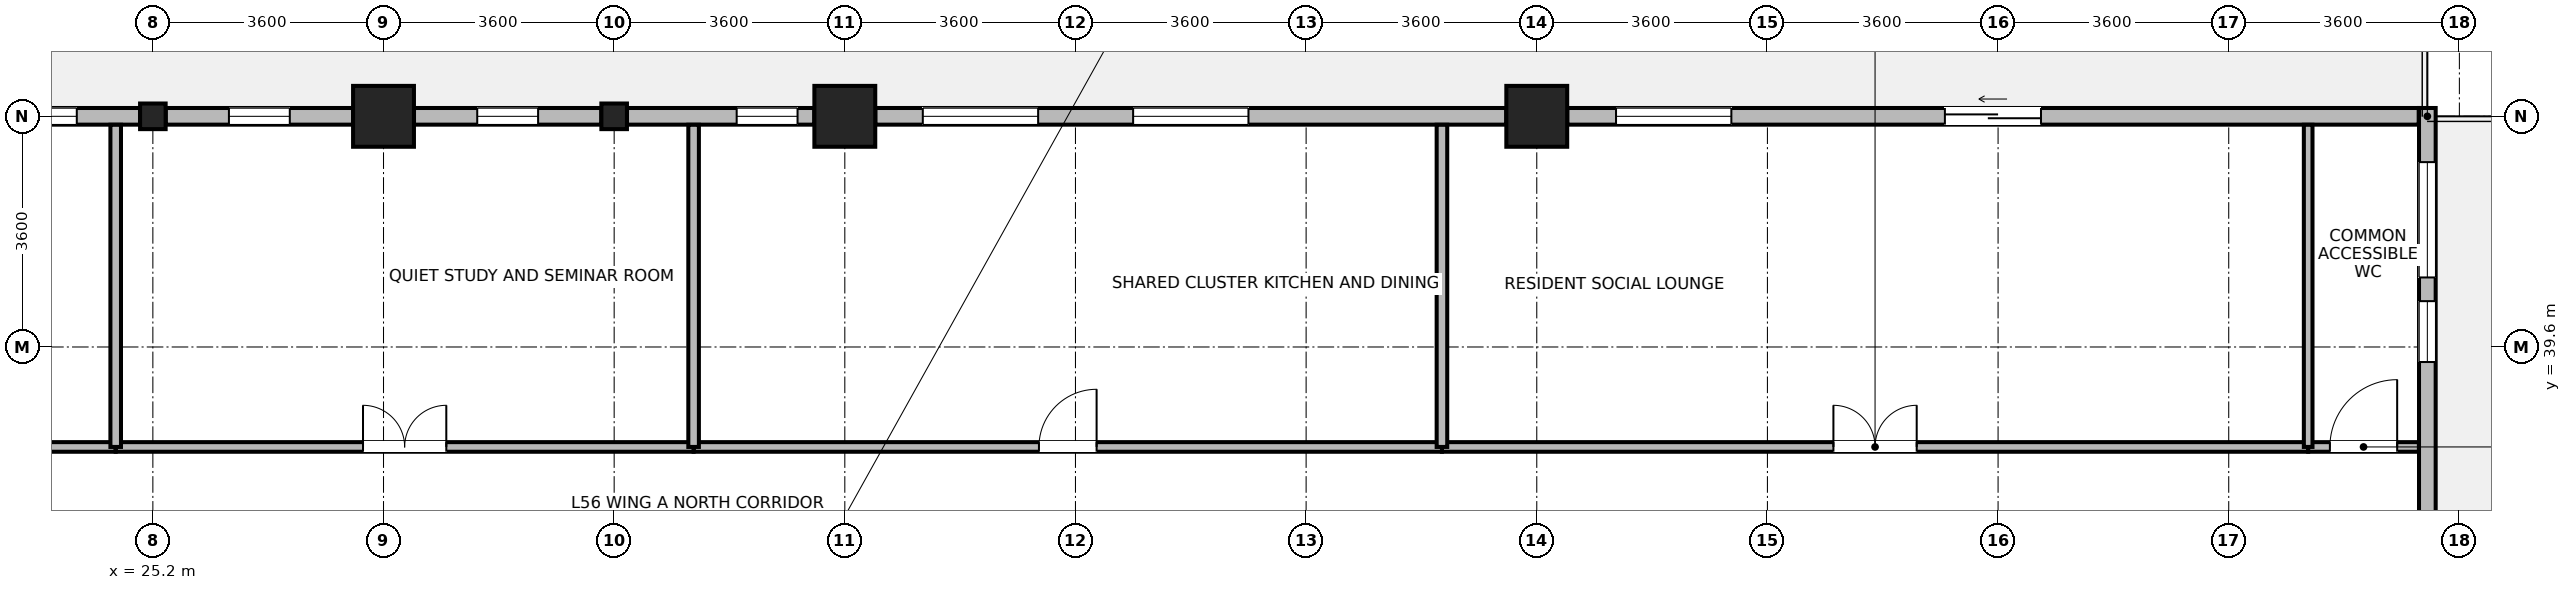
"""IFC4 building model, lengths in metres.
Left out: names, types, materials, properties, quantities, classifications, styles, units other than length and angle.
Written with IfcOpenShell. Run it as: python <this file> out.ifc"""

import sys

from ifc_helpers import new_model, si_unit, direction, frame, frame_2d, origin, origin_2d, place, context, subcontext, project, spatial, rectangle, i_section, extrude, source, transform, mapped, element, fill, save


model = new_model("IFC4")
c1 = context("Model", 3, precision=1e-05, world=origin(), true_north=direction((0.0, 1.0)))
c2 = subcontext(c1, "Body", "Model", "MODEL_VIEW")
j1 = project(units=[si_unit("LENGTHUNIT", "METRE"), si_unit("PLANEANGLEUNIT", "RADIAN")], contexts=[c1])
p1 = place(None, origin())
s1 = spatial("IfcSite", under=j1, at=p1, CompositionType="ELEMENT")
p2 = place(p1, origin())
s2 = spatial("IfcBuilding", under=s1, at=p2, CompositionType="ELEMENT")
p3 = place(p2, frame((0.0, 0.0, 220.3)))
s3 = spatial("IfcBuildingStorey", under=s2, at=p3, CompositionType="ELEMENT", Elevation=220.3)
m1 = source(origin(), c2, "Body", "SweptSolid", [
    extrude(rectangle(XDim=0.95, YDim=0.95, at=origin_2d()), origin(), (0.0, 0.0, 1.0), 3.7),
])
for number, where, z_axis, x_axis in (
    (1, (28.8, 43.2, 0.0), (0.0, 0.0, 1.0), (1.0, 0.0, 0.0)),
    (2, (36.0, 43.2, 0.0), (0.0, 0.0, 1.0), (1.0, 0.0, 0.0)),
    (3, (46.8, 43.2, 0.0), (0.0, 0.0, 1.0), (1.0, 0.0, 0.0)),
):
    element("IfcColumn", number, at=place(p3, frame(where, z_axis=z_axis, x_axis=x_axis)), inside=s3, PredefinedType="COLUMN", context=c2, shape_type="MappedRepresentation", body=[
        mapped(m1, transform((0.0, 0.0, 0.0), x_axis=(1.0, 0.0, 0.0), y_axis=(0.0, 1.0, 0.0), z_axis=(0.0, 0.0, 1.0), scale=1.0)),
    ])
m2 = source(origin(), c2, "Body", "SweptSolid", [
    extrude(i_section(OverallWidth=0.399, OverallDepth=0.4, WebThickness=0.017, FlangeThickness=0.023, FilletRadius=0.015, at=origin_2d()), origin(), (0.0, 0.0, 1.0), 3.7),
])
for number, where, z_axis, x_axis in (
    (4, (25.2, 43.2, 0.0), (0.0, 0.0, 1.0), (1.0, 0.0, 0.0)),
    (5, (32.4, 43.2, 0.0), (0.0, 0.0, 1.0), (1.0, 0.0, 0.0)),
):
    element("IfcColumn", number, at=place(p3, frame(where, z_axis=z_axis, x_axis=x_axis)), inside=s3, PredefinedType="COLUMN", context=c2, shape_type="MappedRepresentation", body=[
        mapped(m2, transform((0.0, 0.0, 0.0), x_axis=(1.0, 0.0, 0.0), y_axis=(0.0, 1.0, 0.0), z_axis=(0.0, 0.0, 1.0), scale=1.0)),
    ])
p4 = place(p3, frame((60.7, 43.33, 0.0), z_axis=(0.0, 0.0, 1.0), x_axis=(0.0, -1.0, 0.0)))
e6 = element("IfcWall", 6, at=p4, inside=s3, PredefinedType="STANDARD", context=c2, shape_type="SweptSolid", body=[
    extrude(rectangle(XDim=6.979, YDim=0.26, at=frame_2d((3.49, 0.0))), origin(), (0.0, 0.0, 1.0), 3.45),
])
p5 = place(p4, frame((0.845, 0.0, 0.85)))
e7 = element("IfcOpeningElement", 7, at=p5, cuts=e6, PredefinedType="OPENING", context=c2, shape_type="SweptSolid", body=[
    extrude(rectangle(XDim=1.8, YDim=1.85, at=frame_2d((0.9, 0.925))), frame((0.0, 0.14, 0.0), z_axis=(0.0, -1.0, 0.0), x_axis=(1.0, 0.0, 0.0)), (0.0, 0.0, 1.0), 0.28),
])
p6 = place(p4, frame((3.014, 0.0, 0.85)))
e8 = element("IfcOpeningElement", 8, at=p6, cuts=e6, PredefinedType="OPENING", context=c2, shape_type="SweptSolid", body=[
    extrude(rectangle(XDim=0.95, YDim=1.75, at=frame_2d((0.475, 0.875))), frame((0.0, 0.14, 0.0), z_axis=(0.0, -1.0, 0.0), x_axis=(1.0, 0.0, 0.0)), (0.0, 0.0, 1.0), 0.28),
])
p7 = place(p3, frame((47.276, 43.2, 0.0), z_axis=(0.0, 0.0, 1.0), x_axis=(1.0, 0.0, 0.0)))
e9 = element("IfcWall", 9, at=p7, inside=s3, PredefinedType="STANDARD", context=c2, shape_type="SweptSolid", body=[
    extrude(rectangle(XDim=13.289, YDim=0.26, at=frame_2d((6.645, 0.0))), origin(), (0.0, 0.0, 1.0), 3.45),
])
p8 = place(p7, frame((5.894, 0.0, 0.0)))
e10 = element("IfcOpeningElement", 10, at=p8, cuts=e9, PredefinedType="OPENING", context=c2, shape_type="SweptSolid", body=[
    extrude(rectangle(XDim=1.5, YDim=2.15, at=frame_2d((0.75, 1.075))), frame((0.0, 0.14, 0.0), z_axis=(0.0, -1.0, 0.0), x_axis=(1.0, 0.0, 0.0)), (0.0, 0.0, 1.0), 0.28),
])
p9 = place(p7, frame((0.761, 0.0, 0.85)))
e11 = element("IfcOpeningElement", 11, at=p9, cuts=e9, PredefinedType="OPENING", context=c2, shape_type="SweptSolid", body=[
    extrude(rectangle(XDim=1.8, YDim=1.85, at=frame_2d((0.9, 0.925))), frame((0.0, 0.14, 0.0), z_axis=(0.0, -1.0, 0.0), x_axis=(1.0, 0.0, 0.0)), (0.0, 0.0, 1.0), 0.28),
])
p10 = place(p3, frame((36.476, 43.2, 0.0), z_axis=(0.0, 0.0, 1.0), x_axis=(1.0, 0.0, 0.0)))
e12 = element("IfcWall", 12, at=p10, inside=s3, PredefinedType="STANDARD", context=c2, shape_type="SweptSolid", body=[
    extrude(rectangle(XDim=9.848, YDim=0.26, at=frame_2d((4.924, 0.0))), origin(), (0.0, 0.0, 1.0), 3.05),
])
p11 = place(p10, frame((0.741, 0.0, 0.85)))
e13 = element("IfcOpeningElement", 13, at=p11, cuts=e12, PredefinedType="OPENING", context=c2, shape_type="SweptSolid", body=[
    extrude(rectangle(XDim=1.8, YDim=1.85, at=frame_2d((0.9, 0.925))), frame((0.0, 0.14, 0.0), z_axis=(0.0, -1.0, 0.0), x_axis=(1.0, 0.0, 0.0)), (0.0, 0.0, 1.0), 0.28),
])
p12 = place(p10, frame((4.024, 0.0, 0.85)))
e14 = element("IfcOpeningElement", 14, at=p12, cuts=e12, PredefinedType="OPENING", context=c2, shape_type="SweptSolid", body=[
    extrude(rectangle(XDim=1.8, YDim=1.85, at=frame_2d((0.9, 0.925))), frame((0.0, 0.14, 0.0), z_axis=(0.0, -1.0, 0.0), x_axis=(1.0, 0.0, 0.0)), (0.0, 0.0, 1.0), 0.28),
])
p13 = place(p3, frame((32.601, 43.2, 0.0), z_axis=(0.0, 0.0, 1.0), x_axis=(1.0, 0.0, 0.0)))
e15 = element("IfcWall", 15, at=p13, inside=s3, PredefinedType="STANDARD", context=c2, shape_type="SweptSolid", body=[
    extrude(rectangle(XDim=2.923, YDim=0.26, at=frame_2d((1.462, 0.0))), origin(), (0.0, 0.0, 1.0), 3.05),
])
p14 = place(p13, frame((1.712, 0.0, 0.85)))
e16 = element("IfcOpeningElement", 16, at=p14, cuts=e15, PredefinedType="OPENING", context=c2, shape_type="SweptSolid", body=[
    extrude(rectangle(XDim=0.95, YDim=1.75, at=frame_2d((0.475, 0.875))), frame((0.0, 0.14, 0.0), z_axis=(0.0, -1.0, 0.0), x_axis=(1.0, 0.0, 0.0)), (0.0, 0.0, 1.0), 0.28),
])
p15 = place(p3, frame((29.276, 43.2, 0.0), z_axis=(0.0, 0.0, 1.0), x_axis=(1.0, 0.0, 0.0)))
e17 = element("IfcWall", 17, at=p15, inside=s3, PredefinedType="STANDARD", context=c2, shape_type="SweptSolid", body=[
    extrude(rectangle(XDim=2.924, YDim=0.26, at=frame_2d((1.462, 0.0))), origin(), (0.0, 0.0, 1.0), 3.05),
])
p16 = place(p15, frame((0.987, 0.0, 0.85)))
e18 = element("IfcOpeningElement", 18, at=p16, cuts=e17, PredefinedType="OPENING", context=c2, shape_type="SweptSolid", body=[
    extrude(rectangle(XDim=0.95, YDim=1.75, at=frame_2d((0.475, 0.875))), frame((0.0, 0.14, 0.0), z_axis=(0.0, -1.0, 0.0), x_axis=(1.0, 0.0, 0.0)), (0.0, 0.0, 1.0), 0.28),
])
p17 = place(p3, frame((25.4, 43.2, 0.0), z_axis=(0.0, 0.0, 1.0), x_axis=(1.0, 0.0, 0.0)))
e19 = element("IfcWall", 19, at=p17, inside=s3, PredefinedType="STANDARD", context=c2, shape_type="SweptSolid", body=[
    extrude(rectangle(XDim=2.924, YDim=0.26, at=frame_2d((1.462, 0.0))), origin(), (0.0, 0.0, 1.0), 3.05),
])
p18 = place(p17, frame((0.987, 0.0, 0.85)))
e20 = element("IfcOpeningElement", 20, at=p18, cuts=e19, PredefinedType="OPENING", context=c2, shape_type="SweptSolid", body=[
    extrude(rectangle(XDim=0.95, YDim=1.75, at=frame_2d((0.475, 0.875))), frame((0.0, 0.14, 0.0), z_axis=(0.0, -1.0, 0.0), x_axis=(1.0, 0.0, 0.0)), (0.0, 0.0, 1.0), 0.28),
])
p19 = place(p3, frame((22.076, 43.2, 0.0), z_axis=(0.0, 0.0, 1.0), x_axis=(1.0, 0.0, 0.0)))
e21 = element("IfcWall", 21, at=p19, inside=s3, PredefinedType="STANDARD", context=c2, shape_type="SweptSolid", body=[
    extrude(rectangle(XDim=2.924, YDim=0.26, at=frame_2d((1.462, 0.0))), origin(), (0.0, 0.0, 1.0), 3.05),
])
p20 = place(p19, frame((0.987, 0.0, 0.85)))
e22 = element("IfcOpeningElement", 22, at=p20, cuts=e21, PredefinedType="OPENING", context=c2, shape_type="SweptSolid", body=[
    extrude(rectangle(XDim=0.95, YDim=1.75, at=frame_2d((0.475, 0.875))), frame((0.0, 0.14, 0.0), z_axis=(0.0, -1.0, 0.0), x_axis=(1.0, 0.0, 0.0)), (0.0, 0.0, 1.0), 0.28),
])
p21 = place(p3, frame((45.32, 38.04, 0.0), z_axis=(0.0, 0.0, 1.0), x_axis=(1.0, 0.0, 0.0)))
e23 = element("IfcWall", 23, at=p21, inside=s3, PredefinedType="PARTITIONING", context=c2, shape_type="SweptSolid", body=[
    extrude(rectangle(XDim=13.52, YDim=0.15, at=frame_2d((6.76, 0.0))), origin(), (0.0, 0.0, 1.0), 3.45),
])
p22 = place(p21, frame((6.11, 0.0, 0.0)))
e24 = element("IfcOpeningElement", 24, at=p22, cuts=e23, PredefinedType="OPENING", context=c2, shape_type="SweptSolid", body=[
    extrude(rectangle(XDim=1.3, YDim=2.12, at=frame_2d((0.65, 1.06))), frame((0.0, 0.085, 0.0), z_axis=(0.0, -1.0, 0.0), x_axis=(1.0, 0.0, 0.0)), (0.0, 0.0, 1.0), 0.17),
])
p23 = place(p3, frame((33.64, 38.04, 0.0), z_axis=(0.0, 0.0, 1.0), x_axis=(1.0, 0.0, 0.0)))
e25 = element("IfcWall", 25, at=p23, inside=s3, PredefinedType="PARTITIONING", context=c2, shape_type="SweptSolid", body=[
    extrude(rectangle(XDim=11.68, YDim=0.15, at=frame_2d((5.84, 0.0))), origin(), (0.0, 0.0, 1.0), 3.45),
])
p24 = place(p23, frame((5.39, 0.0, 0.0)))
e26 = element("IfcOpeningElement", 26, at=p24, cuts=e25, PredefinedType="OPENING", context=c2, shape_type="SweptSolid", body=[
    extrude(rectangle(XDim=0.9, YDim=2.08, at=frame_2d((0.45, 1.04))), frame((0.0, 0.085, 0.0), z_axis=(0.0, -1.0, 0.0), x_axis=(1.0, 0.0, 0.0)), (0.0, 0.0, 1.0), 0.17),
])
p25 = place(p3, frame((14.92, 38.04, 0.0), z_axis=(0.0, 0.0, 1.0), x_axis=(1.0, 0.0, 0.0)))
e27 = element("IfcWall", 27, at=p25, inside=s3, PredefinedType="PARTITIONING", context=c2, shape_type="SweptSolid", body=[
    extrude(rectangle(XDim=9.7, YDim=0.15, at=frame_2d((4.85, 0.0))), origin(), (0.0, 0.0, 1.0), 3.45),
])
p26 = place(p25, frame((4.2, 0.0, 0.0)))
e28 = element("IfcOpeningElement", 28, at=p26, cuts=e27, PredefinedType="OPENING", context=c2, shape_type="SweptSolid", body=[
    extrude(rectangle(XDim=1.3, YDim=2.12, at=frame_2d((0.65, 1.06))), frame((0.0, 0.085, 0.0), z_axis=(0.0, -1.0, 0.0), x_axis=(1.0, 0.0, 0.0)), (0.0, 0.0, 1.0), 0.17),
])
p27 = place(p3, frame((24.62, 38.04, 0.0), z_axis=(0.0, 0.0, 1.0), x_axis=(1.0, 0.0, 0.0)))
e29 = element("IfcWall", 29, at=p27, inside=s3, PredefinedType="PARTITIONING", context=c2, shape_type="SweptSolid", body=[
    extrude(rectangle(XDim=9.02, YDim=0.15, at=frame_2d((4.51, 0.0))), origin(), (0.0, 0.0, 1.0), 3.45),
])
p28 = place(p27, frame((3.86, 0.0, 0.0)))
e30 = element("IfcOpeningElement", 30, at=p28, cuts=e29, PredefinedType="OPENING", context=c2, shape_type="SweptSolid", body=[
    extrude(rectangle(XDim=1.3, YDim=2.12, at=frame_2d((0.65, 1.06))), frame((0.0, 0.085, 0.0), z_axis=(0.0, -1.0, 0.0), x_axis=(1.0, 0.0, 0.0)), (0.0, 0.0, 1.0), 0.17),
])
p29 = place(p3, frame((58.84, 38.04, 0.0), z_axis=(0.0, 0.0, 1.0), x_axis=(1.0, 0.0, 0.0)))
e31 = element("IfcWall", 31, at=p29, inside=s3, PredefinedType="PARTITIONING", context=c2, shape_type="SweptSolid", body=[
    extrude(rectangle(XDim=1.728, YDim=0.15, at=frame_2d((0.864, 0.0))), origin(), (0.0, 0.0, 1.0), 3.45),
])
p30 = place(p29, frame((0.339, 0.0, 0.0)))
e32 = element("IfcOpeningElement", 32, at=p30, cuts=e31, PredefinedType="OPENING", context=c2, shape_type="SweptSolid", body=[
    extrude(rectangle(XDim=1.05, YDim=2.12, at=frame_2d((0.525, 1.06))), frame((0.0, 0.085, 0.0), z_axis=(0.0, -1.0, 0.0), x_axis=(1.0, 0.0, 0.0)), (0.0, 0.0, 1.0), 0.17),
])
for number, where, z_axis, x_axis in (
    (33, (24.62, 38.04, 0.0), (0.0, 0.0, 1.0), (0.0, 1.0, 0.0)),
    (34, (33.64, 38.04, 0.0), (0.0, 0.0, 1.0), (0.0, 1.0, 0.0)),
    (35, (45.32, 38.04, 0.0), (0.0, 0.0, 1.0), (0.0, 1.0, 0.0)),
):
    element("IfcWall", number, at=place(p3, frame(where, z_axis=z_axis, x_axis=x_axis)), inside=s3, PredefinedType="PARTITIONING", context=c2, shape_type="SweptSolid", body=[
        extrude(rectangle(XDim=5.028, YDim=0.165, at=frame_2d((2.514, 0.0))), origin(), (0.0, 0.0, 1.0), 3.45),
    ])
p31 = place(p3, frame((58.84, 38.04, 0.0), z_axis=(0.0, 0.0, 1.0), x_axis=(0.0, 1.0, 0.0)))
e36 = element("IfcWall", 36, at=p31, inside=s3, PredefinedType="PARTITIONING", context=c2, shape_type="SweptSolid", body=[
    extrude(rectangle(XDim=5.028, YDim=0.135, at=frame_2d((2.514, 0.0))), origin(), (0.0, 0.0, 1.0), 3.45),
])
p32 = place(p5, origin())
e37 = element("IfcWindow", 37, at=p32, inside=s3, PartitioningType="SINGLE_PANEL", PredefinedType="WINDOW", context=c2, shape_type="SweptSolid", body=[
    extrude(rectangle(XDim=1.8, YDim=1.85, at=frame_2d((0.9, 0.925))), frame((0.0, 0.03, 0.0), z_axis=(0.0, -1.0, 0.0), x_axis=(1.0, 0.0, 0.0)), (0.0, 0.0, 1.0), 0.06),
])
fill(e7, e37)
p33 = place(p6, origin())
e38 = element("IfcWindow", 38, at=p33, inside=s3, PartitioningType="SINGLE_PANEL", PredefinedType="WINDOW", context=c2, shape_type="SweptSolid", body=[
    extrude(rectangle(XDim=0.95, YDim=1.75, at=frame_2d((0.475, 0.875))), frame((0.0, 0.03, 0.0), z_axis=(0.0, -1.0, 0.0), x_axis=(1.0, 0.0, 0.0)), (0.0, 0.0, 1.0), 0.06),
])
fill(e8, e38)
p34 = place(p8, origin())
e39 = element("IfcDoor", 39, at=p34, inside=s3, OperationType="SLIDING_TO_LEFT", PredefinedType="DOOR", context=c2, shape_type="SweptSolid", body=[
    extrude(rectangle(XDim=1.5, YDim=2.15, at=frame_2d((0.75, 1.075))), frame((0.0, 0.025, 0.0), z_axis=(0.0, -1.0, 0.0), x_axis=(1.0, 0.0, 0.0)), (0.0, 0.0, 1.0), 0.05),
])
fill(e10, e39)
p35 = place(p9, origin())
e40 = element("IfcWindow", 40, at=p35, inside=s3, PartitioningType="SINGLE_PANEL", PredefinedType="WINDOW", context=c2, shape_type="SweptSolid", body=[
    extrude(rectangle(XDim=1.8, YDim=1.85, at=frame_2d((0.9, 0.925))), frame((0.0, 0.03, 0.0), z_axis=(0.0, -1.0, 0.0), x_axis=(1.0, 0.0, 0.0)), (0.0, 0.0, 1.0), 0.06),
])
fill(e11, e40)
p36 = place(p11, origin())
e41 = element("IfcWindow", 41, at=p36, inside=s3, PartitioningType="SINGLE_PANEL", PredefinedType="WINDOW", context=c2, shape_type="SweptSolid", body=[
    extrude(rectangle(XDim=1.8, YDim=1.85, at=frame_2d((0.9, 0.925))), frame((0.0, 0.03, 0.0), z_axis=(0.0, -1.0, 0.0), x_axis=(1.0, 0.0, 0.0)), (0.0, 0.0, 1.0), 0.06),
])
fill(e13, e41)
p37 = place(p12, origin())
e42 = element("IfcWindow", 42, at=p37, inside=s3, PartitioningType="SINGLE_PANEL", PredefinedType="WINDOW", context=c2, shape_type="SweptSolid", body=[
    extrude(rectangle(XDim=1.8, YDim=1.85, at=frame_2d((0.9, 0.925))), frame((0.0, 0.03, 0.0), z_axis=(0.0, -1.0, 0.0), x_axis=(1.0, 0.0, 0.0)), (0.0, 0.0, 1.0), 0.06),
])
fill(e14, e42)
p38 = place(p14, origin())
e43 = element("IfcWindow", 43, at=p38, inside=s3, PartitioningType="SINGLE_PANEL", PredefinedType="WINDOW", context=c2, shape_type="SweptSolid", body=[
    extrude(rectangle(XDim=0.95, YDim=1.75, at=frame_2d((0.475, 0.875))), frame((0.0, 0.03, 0.0), z_axis=(0.0, -1.0, 0.0), x_axis=(1.0, 0.0, 0.0)), (0.0, 0.0, 1.0), 0.06),
])
fill(e16, e43)
p39 = place(p16, origin())
e44 = element("IfcWindow", 44, at=p39, inside=s3, PartitioningType="SINGLE_PANEL", PredefinedType="WINDOW", context=c2, shape_type="SweptSolid", body=[
    extrude(rectangle(XDim=0.95, YDim=1.75, at=frame_2d((0.475, 0.875))), frame((0.0, 0.03, 0.0), z_axis=(0.0, -1.0, 0.0), x_axis=(1.0, 0.0, 0.0)), (0.0, 0.0, 1.0), 0.06),
])
fill(e18, e44)
p40 = place(p18, origin())
e45 = element("IfcWindow", 45, at=p40, inside=s3, PartitioningType="SINGLE_PANEL", PredefinedType="WINDOW", context=c2, shape_type="SweptSolid", body=[
    extrude(rectangle(XDim=0.95, YDim=1.75, at=frame_2d((0.475, 0.875))), frame((0.0, 0.03, 0.0), z_axis=(0.0, -1.0, 0.0), x_axis=(1.0, 0.0, 0.0)), (0.0, 0.0, 1.0), 0.06),
])
fill(e20, e45)
p41 = place(p20, origin())
e46 = element("IfcWindow", 46, at=p41, inside=s3, PartitioningType="SINGLE_PANEL", PredefinedType="WINDOW", context=c2, shape_type="SweptSolid", body=[
    extrude(rectangle(XDim=0.95, YDim=1.75, at=frame_2d((0.475, 0.875))), frame((0.0, 0.03, 0.0), z_axis=(0.0, -1.0, 0.0), x_axis=(1.0, 0.0, 0.0)), (0.0, 0.0, 1.0), 0.06),
])
fill(e22, e46)
p42 = place(p22, origin())
e47 = element("IfcDoor", 47, at=p42, inside=s3, OperationType="DOUBLE_DOOR_SINGLE_SWING", PredefinedType="DOOR", context=c2, shape_type="SweptSolid", body=[
    extrude(rectangle(XDim=1.3, YDim=2.12, at=frame_2d((0.65, 1.06))), frame((0.0, 0.025, 0.0), z_axis=(0.0, -1.0, 0.0), x_axis=(1.0, 0.0, 0.0)), (0.0, 0.0, 1.0), 0.05),
])
fill(e24, e47)
p43 = place(p24, origin())
e48 = element("IfcDoor", 48, at=p43, inside=s3, OperationType="SINGLE_SWING_RIGHT", PredefinedType="DOOR", context=c2, shape_type="SweptSolid", body=[
    extrude(rectangle(XDim=0.9, YDim=2.08, at=frame_2d((0.45, 1.04))), frame((0.0, 0.025, 0.0), z_axis=(0.0, -1.0, 0.0), x_axis=(1.0, 0.0, 0.0)), (0.0, 0.0, 1.0), 0.05),
])
fill(e26, e48)
p44 = place(p28, origin())
e49 = element("IfcDoor", 49, at=p44, inside=s3, OperationType="DOUBLE_DOOR_SINGLE_SWING", PredefinedType="DOOR", context=c2, shape_type="SweptSolid", body=[
    extrude(rectangle(XDim=1.3, YDim=2.12, at=frame_2d((0.65, 1.06))), frame((0.0, 0.025, 0.0), z_axis=(0.0, -1.0, 0.0), x_axis=(1.0, 0.0, 0.0)), (0.0, 0.0, 1.0), 0.05),
])
fill(e30, e49)
p45 = place(p30, origin())
e50 = element("IfcDoor", 50, at=p45, inside=s3, OperationType="SINGLE_SWING_RIGHT", PredefinedType="DOOR", context=c2, shape_type="SweptSolid", body=[
    extrude(rectangle(XDim=1.05, YDim=2.12, at=frame_2d((0.525, 1.06))), frame((0.0, 0.025, 0.0), z_axis=(0.0, -1.0, 0.0), x_axis=(1.0, 0.0, 0.0)), (0.0, 0.0, 1.0), 0.05),
])
fill(e32, e50)
save(model, sys.argv[1])
